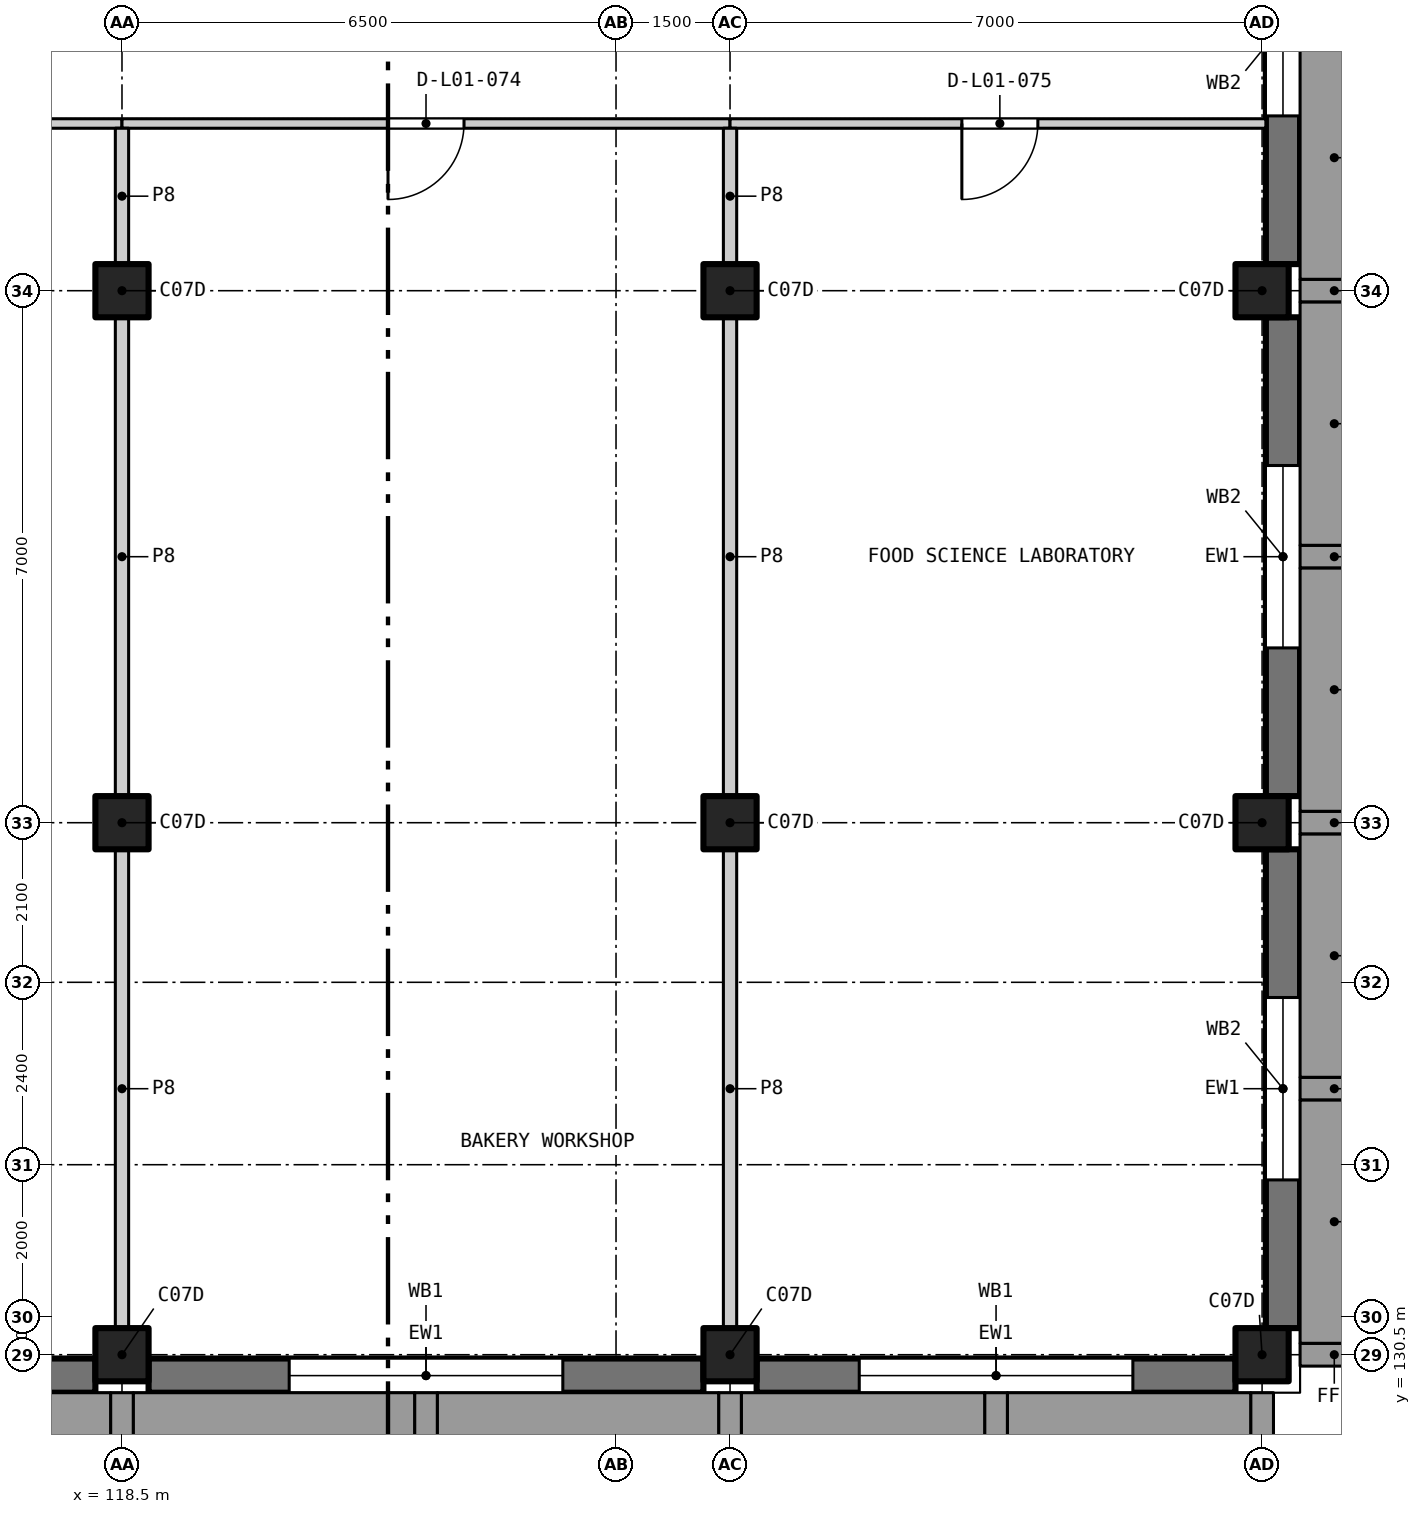
"""IFC4 building model, lengths in metres.
Left out: names, types, materials, properties, quantities, classifications, styles, units other than length and angle.
Written with IfcOpenShell. Run it as: python <this file> out.ifc"""

import sys

from ifc_helpers import new_model, si_unit, direction, frame, frame_2d, origin, origin_2d, place, context, subcontext, project, spatial, rectangle, extrude, element, fill, save


model = new_model("IFC4")
c1 = context("Model", 3, precision=1e-05, world=origin(), true_north=direction((0.0, 1.0)))
c2 = subcontext(c1, "Body", "Model", "MODEL_VIEW")
j1 = project(units=[si_unit("LENGTHUNIT", "METRE"), si_unit("PLANEANGLEUNIT", "RADIAN")], contexts=[c1])
p1 = place(None, origin())
s1 = spatial("IfcSite", under=j1, at=p1, CompositionType="ELEMENT")
p2 = place(p1, origin())
s2 = spatial("IfcBuilding", under=s1, at=p2, CompositionType="ELEMENT")
p3 = place(p2, frame((0.0, 0.0, 6.0)))
s3 = spatial("IfcBuildingStorey", under=s2, at=p3, CompositionType="ELEMENT", Elevation=6.0)
for number, where, z_axis, x_axis in (
    (1, (118.5, 130.5, 0.0), (0.0, 0.0, 1.0), (1.0, 0.0, 0.0)),
    (2, (118.5, 137.5, 0.0), (0.0, 0.0, 1.0), (1.0, 0.0, 0.0)),
    (3, (118.5, 144.5, 0.0), (0.0, 0.0, 1.0), (1.0, 0.0, 0.0)),
    (4, (126.5, 130.5, 0.0), (0.0, 0.0, 1.0), (1.0, 0.0, 0.0)),
    (5, (126.5, 137.5, 0.0), (0.0, 0.0, 1.0), (1.0, 0.0, 0.0)),
    (6, (126.5, 144.5, 0.0), (0.0, 0.0, 1.0), (1.0, 0.0, 0.0)),
    (7, (133.5, 130.5, 0.0), (0.0, 0.0, 1.0), (1.0, 0.0, 0.0)),
    (8, (133.5, 137.5, 0.0), (0.0, 0.0, 1.0), (1.0, 0.0, 0.0)),
    (9, (133.5, 144.5, 0.0), (0.0, 0.0, 1.0), (1.0, 0.0, 0.0)),
):
    element("IfcColumn", number, at=place(p3, frame(where, z_axis=z_axis, x_axis=x_axis)), inside=s3, PredefinedType="COLUMN", context=c2, shape_type="SweptSolid", body=[
        extrude(rectangle(XDim=0.7, YDim=0.7, at=origin_2d()), origin(), (0.0, 0.0, 1.0), 4.2),
    ])
p4 = place(p3, frame((118.15, 130.225, 0.0), z_axis=(0.0, 0.0, 1.0), x_axis=(-1.0, 0.0, 0.0)))
e10 = element("IfcWall", 10, at=p4, inside=s3, PredefinedType="SOLIDWALL", context=c2, shape_type="SweptSolid", body=[
    extrude(rectangle(XDim=7.3, YDim=0.45, at=frame_2d((3.65, 0.0))), origin(), (0.0, 0.0, 1.0), 3.1),
])
p5 = place(p4, frame((1.85, 0.0, 0.9)))
e11 = element("IfcOpeningElement", 11, at=p5, cuts=e10, PredefinedType="OPENING", context=c2, shape_type="SweptSolid", body=[
    extrude(rectangle(XDim=3.6, YDim=1.6, at=frame_2d((1.8, 0.8))), frame((0.0, 0.235, 0.0), z_axis=(0.0, -1.0, 0.0), x_axis=(1.0, 0.0, 0.0)), (0.0, 0.0, 1.0), 0.47),
])
p6 = place(p3, frame((126.15, 130.225, 0.0), z_axis=(0.0, 0.0, 1.0), x_axis=(-1.0, 0.0, 0.0)))
e12 = element("IfcWall", 12, at=p6, inside=s3, PredefinedType="SOLIDWALL", context=c2, shape_type="SweptSolid", body=[
    extrude(rectangle(XDim=7.3, YDim=0.45, at=frame_2d((3.65, 0.0))), origin(), (0.0, 0.0, 1.0), 3.1),
])
p7 = place(p6, frame((1.85, 0.0, 0.9)))
e13 = element("IfcOpeningElement", 13, at=p7, cuts=e12, PredefinedType="OPENING", context=c2, shape_type="SweptSolid", body=[
    extrude(rectangle(XDim=3.6, YDim=1.6, at=frame_2d((1.8, 0.8))), frame((0.0, 0.235, 0.0), z_axis=(0.0, -1.0, 0.0), x_axis=(1.0, 0.0, 0.0)), (0.0, 0.0, 1.0), 0.47),
])
p8 = place(p3, frame((133.15, 130.225, 0.0), z_axis=(0.0, 0.0, 1.0), x_axis=(-1.0, 0.0, 0.0)))
e14 = element("IfcWall", 14, at=p8, inside=s3, PredefinedType="SOLIDWALL", context=c2, shape_type="SweptSolid", body=[
    extrude(rectangle(XDim=6.3, YDim=0.45, at=frame_2d((3.15, 0.0))), origin(), (0.0, 0.0, 1.0), 3.1),
])
p9 = place(p8, frame((1.35, 0.0, 0.9)))
e15 = element("IfcOpeningElement", 15, at=p9, cuts=e14, PredefinedType="OPENING", context=c2, shape_type="SweptSolid", body=[
    extrude(rectangle(XDim=3.6, YDim=1.6, at=frame_2d((1.8, 0.8))), frame((0.0, 0.235, 0.0), z_axis=(0.0, -1.0, 0.0), x_axis=(1.0, 0.0, 0.0)), (0.0, 0.0, 1.0), 0.47),
])
p10 = place(p3, frame((133.775, 137.15, 0.0), z_axis=(0.0, 0.0, 1.0), x_axis=(0.0, -1.0, 0.0)))
e16 = element("IfcWall", 16, at=p10, inside=s3, PredefinedType="SOLIDWALL", context=c2, shape_type="SweptSolid", body=[
    extrude(rectangle(XDim=6.3, YDim=0.45, at=frame_2d((3.15, 0.0))), origin(), (0.0, 0.0, 1.0), 3.2),
])
p11 = place(p10, frame((1.95, 0.0, 0.9)))
e17 = element("IfcOpeningElement", 17, at=p11, cuts=e16, PredefinedType="OPENING", context=c2, shape_type="SweptSolid", body=[
    extrude(rectangle(XDim=2.4, YDim=1.6, at=frame_2d((1.2, 0.8))), frame((0.0, 0.235, 0.0), z_axis=(0.0, -1.0, 0.0), x_axis=(1.0, 0.0, 0.0)), (0.0, 0.0, 1.0), 0.47),
])
p12 = place(p3, frame((133.775, 144.15, 0.0), z_axis=(0.0, 0.0, 1.0), x_axis=(0.0, -1.0, 0.0)))
e18 = element("IfcWall", 18, at=p12, inside=s3, PredefinedType="SOLIDWALL", context=c2, shape_type="SweptSolid", body=[
    extrude(rectangle(XDim=6.3, YDim=0.45, at=frame_2d((3.15, 0.0))), origin(), (0.0, 0.0, 1.0), 3.2),
])
p13 = place(p12, frame((1.95, 0.0, 0.9)))
e19 = element("IfcOpeningElement", 19, at=p13, cuts=e18, PredefinedType="OPENING", context=c2, shape_type="SweptSolid", body=[
    extrude(rectangle(XDim=2.4, YDim=1.6, at=frame_2d((1.2, 0.8))), frame((0.0, 0.235, 0.0), z_axis=(0.0, -1.0, 0.0), x_axis=(1.0, 0.0, 0.0)), (0.0, 0.0, 1.0), 0.47),
])
p14 = place(p3, frame((133.775, 151.15, 0.0), z_axis=(0.0, 0.0, 1.0), x_axis=(0.0, -1.0, 0.0)))
e20 = element("IfcWall", 20, at=p14, inside=s3, PredefinedType="SOLIDWALL", context=c2, shape_type="SweptSolid", body=[
    extrude(rectangle(XDim=6.3, YDim=0.45, at=frame_2d((3.15, 0.0))), origin(), (0.0, 0.0, 1.0), 3.2),
])
p15 = place(p14, frame((1.95, 0.0, 0.9)))
e21 = element("IfcOpeningElement", 21, at=p15, cuts=e20, PredefinedType="OPENING", context=c2, shape_type="SweptSolid", body=[
    extrude(rectangle(XDim=2.4, YDim=1.6, at=frame_2d((1.2, 0.8))), frame((0.0, 0.235, 0.0), z_axis=(0.0, -1.0, 0.0), x_axis=(1.0, 0.0, 0.0)), (0.0, 0.0, 1.0), 0.47),
])
p16 = place(p3, frame((110.5, 146.7, 0.0), z_axis=(0.0, 0.0, 1.0), x_axis=(1.0, 0.0, 0.0)))
e22 = element("IfcWall", 22, at=p16, inside=s3, PredefinedType="PARTITIONING", context=c2, shape_type="SweptSolid", body=[
    extrude(rectangle(XDim=8.0, YDim=0.125, at=frame_2d((4.0, 0.0))), origin(), (0.0, 0.0, 1.0), 3.9),
])
p17 = place(p16, frame((3.5, 0.0, 0.0)))
e23 = element("IfcOpeningElement", 23, at=p17, cuts=e22, PredefinedType="OPENING", context=c2, shape_type="SweptSolid", body=[
    extrude(rectangle(XDim=1.0, YDim=2.1, at=frame_2d((0.5, 1.05))), frame((0.0, 0.073, 0.0), z_axis=(0.0, -1.0, 0.0), x_axis=(1.0, 0.0, 0.0)), (0.0, 0.0, 1.0), 0.145),
])
p18 = place(p3, frame((118.5, 146.7, 0.0), z_axis=(0.0, 0.0, 1.0), x_axis=(1.0, 0.0, 0.0)))
e24 = element("IfcWall", 24, at=p18, inside=s3, PredefinedType="PARTITIONING", context=c2, shape_type="SweptSolid", body=[
    extrude(rectangle(XDim=8.0, YDim=0.125, at=frame_2d((4.0, 0.0))), origin(), (0.0, 0.0, 1.0), 3.9),
])
p19 = place(p18, frame((3.5, 0.0, 0.0)))
e25 = element("IfcOpeningElement", 25, at=p19, cuts=e24, PredefinedType="OPENING", context=c2, shape_type="SweptSolid", body=[
    extrude(rectangle(XDim=1.0, YDim=2.1, at=frame_2d((0.5, 1.05))), frame((0.0, 0.073, 0.0), z_axis=(0.0, -1.0, 0.0), x_axis=(1.0, 0.0, 0.0)), (0.0, 0.0, 1.0), 0.145),
])
p20 = place(p3, frame((126.5, 146.7, 0.0), z_axis=(0.0, 0.0, 1.0), x_axis=(1.0, 0.0, 0.0)))
e26 = element("IfcWall", 26, at=p20, inside=s3, PredefinedType="PARTITIONING", context=c2, shape_type="SweptSolid", body=[
    extrude(rectangle(XDim=7.05, YDim=0.125, at=frame_2d((3.525, 0.0))), origin(), (0.0, 0.0, 1.0), 3.9),
])
p21 = place(p20, frame((3.05, 0.0, 0.0)))
e27 = element("IfcOpeningElement", 27, at=p21, cuts=e26, PredefinedType="OPENING", context=c2, shape_type="SweptSolid", body=[
    extrude(rectangle(XDim=1.0, YDim=2.1, at=frame_2d((0.5, 1.05))), frame((0.0, 0.073, 0.0), z_axis=(0.0, -1.0, 0.0), x_axis=(1.0, 0.0, 0.0)), (0.0, 0.0, 1.0), 0.145),
])
for number, where, z_axis, x_axis in (
    (28, (118.5, 130.85, 0.0), (0.0, 0.0, 1.0), (0.0, 1.0, 0.0)),
    (29, (118.5, 137.85, 0.0), (0.0, 0.0, 1.0), (0.0, 1.0, 0.0)),
):
    element("IfcWall", number, at=place(p3, frame(where, z_axis=z_axis, x_axis=x_axis)), inside=s3, PredefinedType="PARTITIONING", context=c2, shape_type="SweptSolid", body=[
        extrude(rectangle(XDim=6.3, YDim=0.175, at=frame_2d((3.15, 0.0))), origin(), (0.0, 0.0, 1.0), 3.2),
    ])
p22 = place(p3, frame((118.5, 144.85, 0.0), z_axis=(0.0, 0.0, 1.0), x_axis=(0.0, 1.0, 0.0)))
e30 = element("IfcWall", 30, at=p22, inside=s3, PredefinedType="PARTITIONING", context=c2, shape_type="SweptSolid", body=[
    extrude(rectangle(XDim=1.787, YDim=0.175, at=frame_2d((0.894, 0.0))), origin(), (0.0, 0.0, 1.0), 3.2),
])
for number, where, z_axis, x_axis in (
    (31, (126.5, 130.85, 0.0), (0.0, 0.0, 1.0), (0.0, 1.0, 0.0)),
    (32, (126.5, 137.85, 0.0), (0.0, 0.0, 1.0), (0.0, 1.0, 0.0)),
):
    element("IfcWall", number, at=place(p3, frame(where, z_axis=z_axis, x_axis=x_axis)), inside=s3, PredefinedType="PARTITIONING", context=c2, shape_type="SweptSolid", body=[
        extrude(rectangle(XDim=6.3, YDim=0.175, at=frame_2d((3.15, 0.0))), origin(), (0.0, 0.0, 1.0), 3.2),
    ])
p23 = place(p3, frame((126.5, 144.85, 0.0), z_axis=(0.0, 0.0, 1.0), x_axis=(0.0, 1.0, 0.0)))
e33 = element("IfcWall", 33, at=p23, inside=s3, PredefinedType="PARTITIONING", context=c2, shape_type="SweptSolid", body=[
    extrude(rectangle(XDim=1.787, YDim=0.175, at=frame_2d((0.894, 0.0))), origin(), (0.0, 0.0, 1.0), 3.2),
])
p24 = place(p7, origin())
e34 = element("IfcWindow", 34, at=p24, inside=s3, PartitioningType="SINGLE_PANEL", PredefinedType="WINDOW", context=c2, shape_type="SweptSolid", body=[
    extrude(rectangle(XDim=3.6, YDim=1.6, at=frame_2d((1.8, 0.8))), frame((0.0, -0.125, 0.0), z_axis=(0.0, -1.0, 0.0), x_axis=(1.0, 0.0, 0.0)), (0.0, 0.0, 1.0), 0.06),
])
fill(e13, e34)
p25 = place(p9, origin())
e35 = element("IfcWindow", 35, at=p25, inside=s3, PartitioningType="SINGLE_PANEL", PredefinedType="WINDOW", context=c2, shape_type="SweptSolid", body=[
    extrude(rectangle(XDim=3.6, YDim=1.6, at=frame_2d((1.8, 0.8))), frame((0.0, -0.125, 0.0), z_axis=(0.0, -1.0, 0.0), x_axis=(1.0, 0.0, 0.0)), (0.0, 0.0, 1.0), 0.06),
])
fill(e15, e35)
p26 = place(p11, origin())
e36 = element("IfcWindow", 36, at=p26, inside=s3, PartitioningType="SINGLE_PANEL", PredefinedType="WINDOW", context=c2, shape_type="SweptSolid", body=[
    extrude(rectangle(XDim=2.4, YDim=1.6, at=frame_2d((1.2, 0.8))), frame((0.0, -0.125, 0.0), z_axis=(0.0, -1.0, 0.0), x_axis=(1.0, 0.0, 0.0)), (0.0, 0.0, 1.0), 0.06),
])
fill(e17, e36)
p27 = place(p13, origin())
e37 = element("IfcWindow", 37, at=p27, inside=s3, PartitioningType="SINGLE_PANEL", PredefinedType="WINDOW", context=c2, shape_type="SweptSolid", body=[
    extrude(rectangle(XDim=2.4, YDim=1.6, at=frame_2d((1.2, 0.8))), frame((0.0, -0.125, 0.0), z_axis=(0.0, -1.0, 0.0), x_axis=(1.0, 0.0, 0.0)), (0.0, 0.0, 1.0), 0.06),
])
fill(e19, e37)
p28 = place(p15, origin())
e38 = element("IfcWindow", 38, at=p28, inside=s3, PartitioningType="SINGLE_PANEL", PredefinedType="WINDOW", context=c2, shape_type="SweptSolid", body=[
    extrude(rectangle(XDim=2.4, YDim=1.6, at=frame_2d((1.2, 0.8))), frame((0.0, -0.125, 0.0), z_axis=(0.0, -1.0, 0.0), x_axis=(1.0, 0.0, 0.0)), (0.0, 0.0, 1.0), 0.06),
])
fill(e21, e38)
p29 = place(p19, frame((1.0, 0.0, 0.0), z_axis=(0.0, 0.0, 1.0), x_axis=(-1.0, 0.0, 0.0)))
e39 = element("IfcDoor", 39, at=p29, inside=s3, OperationType="SINGLE_SWING_RIGHT", PredefinedType="DOOR", context=c2, shape_type="SweptSolid", body=[
    extrude(rectangle(XDim=1.0, YDim=2.1, at=frame_2d((0.5, 1.05))), frame((0.0, 0.025, 0.0), z_axis=(0.0, -1.0, 0.0), x_axis=(1.0, 0.0, 0.0)), (0.0, 0.0, 1.0), 0.05),
])
fill(e25, e39)
p30 = place(p21, frame((1.0, 0.0, 0.0), z_axis=(0.0, 0.0, 1.0), x_axis=(-1.0, 0.0, 0.0)))
e40 = element("IfcDoor", 40, at=p30, inside=s3, OperationType="SINGLE_SWING_RIGHT", PredefinedType="DOOR", context=c2, shape_type="SweptSolid", body=[
    extrude(rectangle(XDim=1.0, YDim=2.1, at=frame_2d((0.5, 1.05))), frame((0.0, 0.025, 0.0), z_axis=(0.0, -1.0, 0.0), x_axis=(1.0, 0.0, 0.0)), (0.0, 0.0, 1.0), 0.05),
])
fill(e27, e40)
save(model, sys.argv[1])
